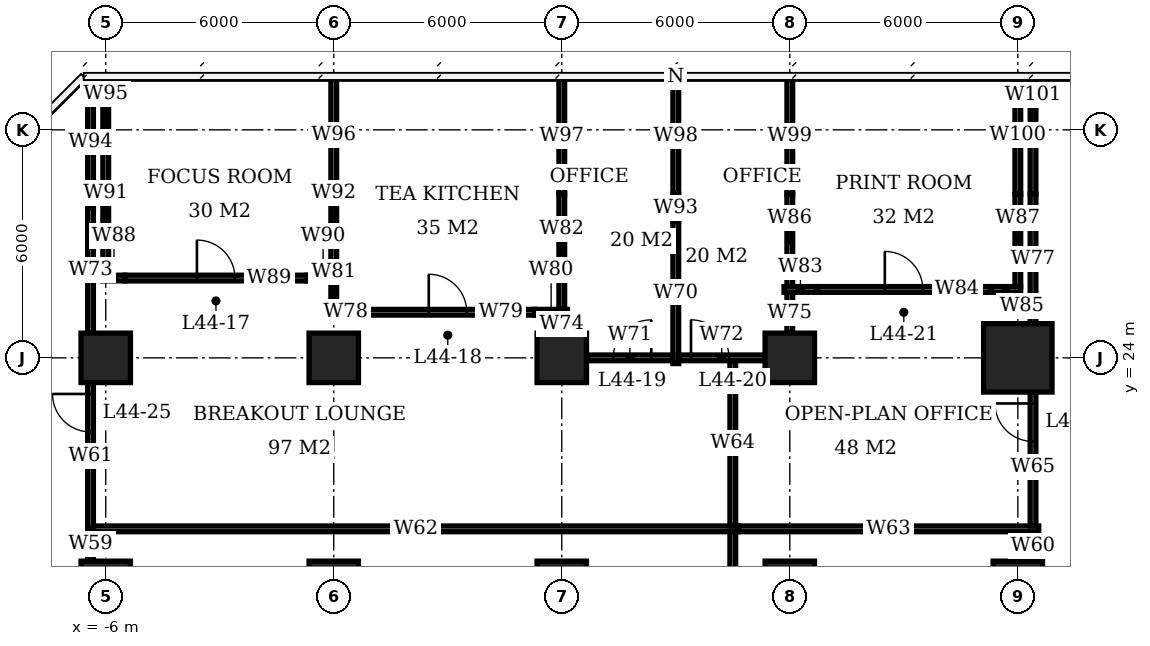
"""IFC4 building model, lengths in metres.
Left out: names, types, materials, properties, quantities, classifications, styles, units other than length and angle.
Written with IfcOpenShell. Run it as: python <this file> out.ifc"""

import sys

from ifc_helpers import new_model, si_unit, direction, frame, frame_2d, origin, origin_2d, place, context, subcontext, project, spatial, rectangle, extrude, element, fill, save


model = new_model("IFC4")
c1 = context("Model", 3, precision=1e-05, world=origin(), true_north=direction((0.0, 1.0)))
c2 = subcontext(c1, "Body", "Model", "MODEL_VIEW")
j1 = project(units=[si_unit("LENGTHUNIT", "METRE"), si_unit("PLANEANGLEUNIT", "RADIAN")], contexts=[c1])
p1 = place(None, origin())
s1 = spatial("IfcSite", under=j1, at=p1, CompositionType="ELEMENT")
p2 = place(p1, origin())
s2 = spatial("IfcBuilding", under=s1, at=p2, CompositionType="ELEMENT")
p3 = place(p2, frame((0.0, 0.0, 181.1)))
s3 = spatial("IfcBuildingStorey", under=s2, at=p3, CompositionType="ELEMENT", Elevation=181.1)
for number, where, z_axis, x_axis in (
    (1, (-6.0, 18.0, 0.0), (0.0, 0.0, 1.0), (1.0, 0.0, 0.0)),
    (2, (-6.0, 24.0, 0.0), (0.0, 0.0, 1.0), (1.0, 0.0, 0.0)),
    (3, (0.0, 18.0, 0.0), (0.0, 0.0, 1.0), (1.0, 0.0, 0.0)),
    (4, (0.0, 24.0, 0.0), (0.0, 0.0, 1.0), (1.0, 0.0, 0.0)),
    (5, (6.0, 18.0, 0.0), (0.0, 0.0, 1.0), (1.0, 0.0, 0.0)),
    (6, (6.0, 24.0, 0.0), (0.0, 0.0, 1.0), (1.0, 0.0, 0.0)),
    (7, (12.0, 18.0, 0.0), (0.0, 0.0, 1.0), (1.0, 0.0, 0.0)),
    (8, (12.0, 24.0, 0.0), (0.0, 0.0, 1.0), (1.0, 0.0, 0.0)),
    (9, (18.0, 18.0, 0.0), (0.0, 0.0, 1.0), (1.0, 0.0, 0.0)),
):
    element("IfcColumn", number, at=place(p3, frame(where, z_axis=z_axis, x_axis=x_axis)), inside=s3, PredefinedType="COLUMN", context=c2, shape_type="SweptSolid", body=[
        extrude(rectangle(XDim=1.3, YDim=1.3, at=origin_2d()), origin(), (0.0, 0.0, 1.0), 3.9),
    ])
p4 = place(p3, frame((18.0, 24.0, 0.0), z_axis=(0.0, 0.0, 1.0), x_axis=(1.0, 0.0, 0.0)))
e10 = element("IfcColumn", 10, at=p4, inside=s3, PredefinedType="COLUMN", context=c2, shape_type="SweptSolid", body=[
    extrude(rectangle(XDim=1.8, YDim=1.8, at=origin_2d()), origin(), (0.0, 0.0, 1.0), 3.9),
])
p5 = place(p3, frame((6.66, 24.0, 0.0), z_axis=(0.0, 0.0, 1.0), x_axis=(1.0, 0.0, 0.0)))
e11 = element("IfcWall", 11, at=p5, inside=s3, PredefinedType="PARTITIONING", context=c2, shape_type="SweptSolid", body=[
    extrude(rectangle(XDim=2.265, YDim=0.15, at=frame_2d((1.133, 0.0))), origin(), (0.0, 0.0, 1.0), 3.65),
])
p6 = place(p5, frame((0.695, 0.0, 0.0)))
e12 = element("IfcOpeningElement", 12, at=p6, cuts=e11, PredefinedType="OPENING", context=c2, shape_type="SweptSolid", body=[
    extrude(rectangle(XDim=1.0, YDim=2.1, at=frame_2d((0.5, 1.05))), frame((0.0, 0.085, 0.0), z_axis=(0.0, -1.0, 0.0), x_axis=(1.0, 0.0, 0.0)), (0.0, 0.0, 1.0), 0.17),
])
p7 = place(p3, frame((9.075, 24.0, 0.0), z_axis=(0.0, 0.0, 1.0), x_axis=(1.0, 0.0, 0.0)))
e13 = element("IfcWall", 13, at=p7, inside=s3, PredefinedType="PARTITIONING", context=c2, shape_type="SweptSolid", body=[
    extrude(rectangle(XDim=2.265, YDim=0.15, at=frame_2d((1.133, 0.0))), origin(), (0.0, 0.0, 1.0), 3.65),
])
p8 = place(p7, frame((0.325, 0.0, 0.0)))
e14 = element("IfcOpeningElement", 14, at=p8, cuts=e13, PredefinedType="OPENING", context=c2, shape_type="SweptSolid", body=[
    extrude(rectangle(XDim=1.0, YDim=2.1, at=frame_2d((0.5, 1.05))), frame((0.0, 0.085, 0.0), z_axis=(0.0, -1.0, 0.0), x_axis=(1.0, 0.0, 0.0)), (0.0, 0.0, 1.0), 0.17),
])
p9 = place(p3, frame((-0.075, 25.2, 0.0), z_axis=(0.0, 0.0, 1.0), x_axis=(1.0, 0.0, 0.0)))
e15 = element("IfcWall", 15, at=p9, inside=s3, PredefinedType="PARTITIONING", context=c2, shape_type="SweptSolid", body=[
    extrude(rectangle(XDim=0.785, YDim=0.15, at=frame_2d((0.393, 0.0))), origin(), (0.0, 0.0, 1.0), 2.65),
])
p10 = place(p3, frame((0.71, 25.2, 0.0), z_axis=(0.0, 0.0, 1.0), x_axis=(1.0, 0.0, 0.0)))
e16 = element("IfcWall", 16, at=p10, inside=s3, PredefinedType="PARTITIONING", context=c2, shape_type="SweptSolid", body=[
    extrude(rectangle(XDim=4.58, YDim=0.15, at=frame_2d((2.29, 0.0))), origin(), (0.0, 0.0, 1.0), 3.65),
])
p11 = place(p10, frame((1.79, 0.0, 0.0)))
e17 = element("IfcOpeningElement", 17, at=p11, cuts=e16, PredefinedType="OPENING", context=c2, shape_type="SweptSolid", body=[
    extrude(rectangle(XDim=1.0, YDim=2.1, at=frame_2d((0.5, 1.05))), frame((0.0, 0.085, 0.0), z_axis=(0.0, -1.0, 0.0), x_axis=(1.0, 0.0, 0.0)), (0.0, 0.0, 1.0), 0.17),
])
for number, where, z_axis, x_axis in (
    (18, (5.29, 25.2, 0.0), (0.0, 0.0, 1.0), (1.0, 0.0, 0.0)),
    (19, (11.85, 25.8, 0.0), (0.0, 0.0, 1.0), (1.0, 0.0, 0.0)),
):
    element("IfcWall", number, at=place(p3, frame(where, z_axis=z_axis, x_axis=x_axis)), inside=s3, PredefinedType="PARTITIONING", context=c2, shape_type="SweptSolid", body=[
        extrude(rectangle(XDim=0.86, YDim=0.15, at=frame_2d((0.43, 0.0))), origin(), (0.0, 0.0, 1.0), 2.65),
    ])
p12 = place(p3, frame((12.71, 25.8, 0.0), z_axis=(0.0, 0.0, 1.0), x_axis=(1.0, 0.0, 0.0)))
e20 = element("IfcWall", 20, at=p12, inside=s3, PredefinedType="PARTITIONING", context=c2, shape_type="SweptSolid", body=[
    extrude(rectangle(XDim=4.58, YDim=0.15, at=frame_2d((2.29, 0.0))), origin(), (0.0, 0.0, 1.0), 3.65),
])
p13 = place(p12, frame((1.79, 0.0, 0.0)))
e21 = element("IfcOpeningElement", 21, at=p13, cuts=e20, PredefinedType="OPENING", context=c2, shape_type="SweptSolid", body=[
    extrude(rectangle(XDim=1.0, YDim=2.1, at=frame_2d((0.5, 1.05))), frame((0.0, 0.085, 0.0), z_axis=(0.0, -1.0, 0.0), x_axis=(1.0, 0.0, 0.0)), (0.0, 0.0, 1.0), 0.17),
])
p14 = place(p3, frame((17.29, 25.8, 0.0), z_axis=(0.0, 0.0, 1.0), x_axis=(1.0, 0.0, 0.0)))
e22 = element("IfcWall", 22, at=p14, inside=s3, PredefinedType="PARTITIONING", context=c2, shape_type="SweptSolid", body=[
    extrude(rectangle(XDim=0.785, YDim=0.15, at=frame_2d((0.393, 0.0))), origin(), (0.0, 0.0, 1.0), 2.65),
])
p15 = place(p3, frame((-6.075, 26.1, 0.0), z_axis=(0.0, 0.0, 1.0), x_axis=(1.0, 0.0, 0.0)))
e23 = element("IfcWall", 23, at=p15, inside=s3, PredefinedType="PARTITIONING", context=c2, shape_type="SweptSolid", body=[
    extrude(rectangle(XDim=0.585, YDim=0.15, at=frame_2d((0.292, 0.0))), origin(), (0.0, 0.0, 1.0), 2.65),
])
p16 = place(p3, frame((-5.49, 26.1, 0.0), z_axis=(0.0, 0.0, 1.0), x_axis=(1.0, 0.0, 0.0)))
e24 = element("IfcWall", 24, at=p16, inside=s3, PredefinedType="PARTITIONING", context=c2, shape_type="SweptSolid", body=[
    extrude(rectangle(XDim=4.78, YDim=0.15, at=frame_2d((2.39, 0.0))), origin(), (0.0, 0.0, 1.0), 3.65),
])
p17 = place(p16, frame((1.89, 0.0, 0.0)))
e25 = element("IfcOpeningElement", 25, at=p17, cuts=e24, PredefinedType="OPENING", context=c2, shape_type="SweptSolid", body=[
    extrude(rectangle(XDim=1.0, YDim=2.1, at=frame_2d((0.5, 1.05))), frame((0.0, 0.085, 0.0), z_axis=(0.0, -1.0, 0.0), x_axis=(1.0, 0.0, 0.0)), (0.0, 0.0, 1.0), 0.17),
])
p18 = place(p3, frame((-0.71, 26.1, 0.0), z_axis=(0.0, 0.0, 1.0), x_axis=(1.0, 0.0, 0.0)))
e26 = element("IfcWall", 26, at=p18, inside=s3, PredefinedType="PARTITIONING", context=c2, shape_type="SweptSolid", body=[
    extrude(rectangle(XDim=0.86, YDim=0.15, at=frame_2d((0.43, 0.0))), origin(), (0.0, 0.0, 1.0), 2.65),
])
p19 = place(p3, frame((-6.0, 26.175, 0.0), z_axis=(0.0, 0.0, 1.0), x_axis=(0.0, 1.0, 0.0)))
e27 = element("IfcWall", 27, at=p19, inside=s3, PredefinedType="PARTITIONING", context=c2, shape_type="SweptSolid", body=[
    extrude(rectangle(XDim=2.135, YDim=0.15, at=frame_2d((1.067, 0.0))), origin(), (0.0, 0.0, 1.0), 2.65),
])
p20 = place(p3, frame((-6.0, 28.31, 0.0), z_axis=(0.0, 0.0, 1.0), x_axis=(0.0, 1.0, 0.0)))
e28 = element("IfcWall", 28, at=p20, inside=s3, PredefinedType="PARTITIONING", context=c2, shape_type="SweptSolid", body=[
    extrude(rectangle(XDim=3.09, YDim=0.15, at=frame_2d((1.545, 0.0))), origin(), (0.0, 0.0, 1.0), 3.65),
])
p21 = place(p3, frame((0.0, 25.275, 0.0), z_axis=(0.0, 0.0, 1.0), x_axis=(0.0, 1.0, 0.0)))
e29 = element("IfcWall", 29, at=p21, inside=s3, PredefinedType="PARTITIONING", context=c2, shape_type="SweptSolid", body=[
    extrude(rectangle(XDim=0.75, YDim=0.15, at=frame_2d((0.375, 0.0))), origin(), (0.0, 0.0, 1.0), 2.65),
])
p22 = place(p3, frame((0.0, 26.175, 0.0), z_axis=(0.0, 0.0, 1.0), x_axis=(0.0, 1.0, 0.0)))
e30 = element("IfcWall", 30, at=p22, inside=s3, PredefinedType="PARTITIONING", context=c2, shape_type="SweptSolid", body=[
    extrude(rectangle(XDim=2.135, YDim=0.15, at=frame_2d((1.067, 0.0))), origin(), (0.0, 0.0, 1.0), 2.65),
])
p23 = place(p3, frame((0.0, 28.31, 0.0), z_axis=(0.0, 0.0, 1.0), x_axis=(0.0, 1.0, 0.0)))
e31 = element("IfcWall", 31, at=p23, inside=s3, PredefinedType="PARTITIONING", context=c2, shape_type="SweptSolid", body=[
    extrude(rectangle(XDim=3.09, YDim=0.15, at=frame_2d((1.545, 0.0))), origin(), (0.0, 0.0, 1.0), 3.65),
])
p24 = place(p3, frame((6.0, 24.65, 0.0), z_axis=(0.0, 0.0, 1.0), x_axis=(0.0, 1.0, 0.0)))
e32 = element("IfcWall", 32, at=p24, inside=s3, PredefinedType="PARTITIONING", context=c2, shape_type="SweptSolid", body=[
    extrude(rectangle(XDim=0.475, YDim=0.15, at=frame_2d((0.238, 0.0))), origin(), (0.0, 0.0, 1.0), 2.65),
])
p25 = place(p3, frame((6.0, 25.275, 0.0), z_axis=(0.0, 0.0, 1.0), x_axis=(0.0, 1.0, 0.0)))
e33 = element("IfcWall", 33, at=p25, inside=s3, PredefinedType="PARTITIONING", context=c2, shape_type="SweptSolid", body=[
    extrude(rectangle(XDim=3.035, YDim=0.15, at=frame_2d((1.518, 0.0))), origin(), (0.0, 0.0, 1.0), 2.65),
])
p26 = place(p3, frame((6.0, 28.31, 0.0), z_axis=(0.0, 0.0, 1.0), x_axis=(0.0, 1.0, 0.0)))
e34 = element("IfcWall", 34, at=p26, inside=s3, PredefinedType="PARTITIONING", context=c2, shape_type="SweptSolid", body=[
    extrude(rectangle(XDim=3.04, YDim=0.15, at=frame_2d((1.52, 0.0))), origin(), (0.0, 0.0, 1.0), 3.65),
])
p27 = place(p3, frame((9.0, 23.85, 0.0), z_axis=(0.0, 0.0, 1.0), x_axis=(0.0, 1.0, 0.0)))
e35 = element("IfcWall", 35, at=p27, inside=s3, PredefinedType="PARTITIONING", context=c2, shape_type="SweptSolid", body=[
    extrude(rectangle(XDim=3.74, YDim=0.15, at=frame_2d((1.87, 0.0))), origin(), (0.0, 0.0, 1.0), 3.65),
])
p28 = place(p3, frame((9.0, 27.59, 0.0), z_axis=(0.0, 0.0, 1.0), x_axis=(0.0, 1.0, 0.0)))
e36 = element("IfcWall", 36, at=p28, inside=s3, PredefinedType="PARTITIONING", context=c2, shape_type="SweptSolid", body=[
    extrude(rectangle(XDim=0.72, YDim=0.15, at=frame_2d((0.36, 0.0))), origin(), (0.0, 0.0, 1.0), 2.65),
])
p29 = place(p3, frame((9.0, 28.31, 0.0), z_axis=(0.0, 0.0, 1.0), x_axis=(0.0, 1.0, 0.0)))
e37 = element("IfcWall", 37, at=p29, inside=s3, PredefinedType="PARTITIONING", context=c2, shape_type="SweptSolid", body=[
    extrude(rectangle(XDim=3.04, YDim=0.15, at=frame_2d((1.52, 0.0))), origin(), (0.0, 0.0, 1.0), 3.65),
])
p30 = place(p3, frame((12.0, 24.65, 0.0), z_axis=(0.0, 0.0, 1.0), x_axis=(0.0, 1.0, 0.0)))
e38 = element("IfcWall", 38, at=p30, inside=s3, PredefinedType="PARTITIONING", context=c2, shape_type="SweptSolid", body=[
    extrude(rectangle(XDim=1.075, YDim=0.15, at=frame_2d((0.538, 0.0))), origin(), (0.0, 0.0, 1.0), 2.65),
])
p31 = place(p3, frame((12.0, 25.875, 0.0), z_axis=(0.0, 0.0, 1.0), x_axis=(0.0, 1.0, 0.0)))
e39 = element("IfcWall", 39, at=p31, inside=s3, PredefinedType="PARTITIONING", context=c2, shape_type="SweptSolid", body=[
    extrude(rectangle(XDim=2.435, YDim=0.15, at=frame_2d((1.218, 0.0))), origin(), (0.0, 0.0, 1.0), 2.65),
])
p32 = place(p3, frame((12.0, 28.31, 0.0), z_axis=(0.0, 0.0, 1.0), x_axis=(0.0, 1.0, 0.0)))
e40 = element("IfcWall", 40, at=p32, inside=s3, PredefinedType="PARTITIONING", context=c2, shape_type="SweptSolid", body=[
    extrude(rectangle(XDim=3.04, YDim=0.15, at=frame_2d((1.52, 0.0))), origin(), (0.0, 0.0, 1.0), 3.65),
])
p33 = place(p3, frame((18.0, 25.875, 0.0), z_axis=(0.0, 0.0, 1.0), x_axis=(0.0, 1.0, 0.0)))
e41 = element("IfcWall", 41, at=p33, inside=s3, PredefinedType="PARTITIONING", context=c2, shape_type="SweptSolid", body=[
    extrude(rectangle(XDim=2.435, YDim=0.15, at=frame_2d((1.218, 0.0))), origin(), (0.0, 0.0, 1.0), 2.65),
])
p34 = place(p3, frame((18.0, 28.31, 0.0), z_axis=(0.0, 0.0, 1.0), x_axis=(0.0, 1.0, 0.0)))
e42 = element("IfcWall", 42, at=p34, inside=s3, PredefinedType="PARTITIONING", context=c2, shape_type="SweptSolid", body=[
    extrude(rectangle(XDim=3.09, YDim=0.15, at=frame_2d((1.545, 0.0))), origin(), (0.0, 0.0, 1.0), 3.65),
])
p35 = place(p3, frame((-6.4, 18.65, 0.0), z_axis=(0.0, 0.0, 1.0), x_axis=(0.0, 1.0, 0.0)))
e43 = element("IfcWall", 43, at=p35, inside=s3, PredefinedType="PARTITIONING", context=c2, shape_type="SweptSolid", body=[
    extrude(rectangle(XDim=0.925, YDim=0.15, at=frame_2d((0.462, 0.0))), origin(), (0.0, 0.0, 1.0), 3.65),
])
p36 = place(p3, frame((-6.4, 19.5, 0.0), z_axis=(0.0, 0.0, 1.0), x_axis=(0.0, 1.0, 0.0)))
e44 = element("IfcWall", 44, at=p36, inside=s3, PredefinedType="PARTITIONING", context=c2, shape_type="SweptSolid", body=[
    extrude(rectangle(XDim=3.85, YDim=0.15, at=frame_2d((1.925, 0.0))), origin(), (0.0, 0.0, 1.0), 3.65),
])
p37 = place(p36, frame((2.55, 0.0, 0.0)))
e45 = element("IfcOpeningElement", 45, at=p37, cuts=e44, PredefinedType="OPENING", context=c2, shape_type="SweptSolid", body=[
    extrude(rectangle(XDim=1.0, YDim=2.1, at=frame_2d((0.5, 1.05))), frame((0.0, 0.085, 0.0), z_axis=(0.0, -1.0, 0.0), x_axis=(1.0, 0.0, 0.0)), (0.0, 0.0, 1.0), 0.17),
])
p38 = place(p3, frame((-6.4, 24.65, 0.0), z_axis=(0.0, 0.0, 1.0), x_axis=(0.0, 1.0, 0.0)))
e46 = element("IfcWall", 46, at=p38, inside=s3, PredefinedType="PARTITIONING", context=c2, shape_type="SweptSolid", body=[
    extrude(rectangle(XDim=3.31, YDim=0.15, at=frame_2d((1.655, 0.0))), origin(), (0.0, 0.0, 1.0), 2.65),
])
p39 = place(p3, frame((-6.4, 27.96, 0.0), z_axis=(0.0, 0.0, 1.0), x_axis=(0.0, 1.0, 0.0)))
e47 = element("IfcWall", 47, at=p39, inside=s3, PredefinedType="PARTITIONING", context=c2, shape_type="SweptSolid", body=[
    extrude(rectangle(XDim=3.44, YDim=0.15, at=frame_2d((1.72, 0.0))), origin(), (0.0, 0.0, 1.0), 3.65),
])
p40 = place(p3, frame((-6.325, 19.5, 0.0), z_axis=(0.0, 0.0, 1.0), x_axis=(1.0, 0.0, 0.0)))
e48 = element("IfcWall", 48, at=p40, inside=s3, PredefinedType="PARTITIONING", context=c2, shape_type="SweptSolid", body=[
    extrude(rectangle(XDim=16.975, YDim=0.15, at=frame_2d((8.487, 0.0))), origin(), (0.0, 0.0, 1.0), 3.65),
])
p41 = place(p3, frame((10.5, 12.4, 0.0), z_axis=(0.0, 0.0, 1.0), x_axis=(0.0, 1.0, 0.0)))
e49 = element("IfcWall", 49, at=p41, inside=s3, PredefinedType="PARTITIONING", context=c2, shape_type="SweptSolid", body=[
    extrude(rectangle(XDim=7.025, YDim=0.15, at=frame_2d((3.513, 0.0))), origin(), (0.0, 0.0, 1.0), 3.65),
])
p42 = place(p3, frame((10.5, 19.575, 0.0), z_axis=(0.0, 0.0, 1.0), x_axis=(0.0, 1.0, 0.0)))
e50 = element("IfcWall", 50, at=p42, inside=s3, PredefinedType="PARTITIONING", context=c2, shape_type="SweptSolid", body=[
    extrude(rectangle(XDim=4.35, YDim=0.15, at=frame_2d((2.175, 0.0))), origin(), (0.0, 0.0, 1.0), 3.65),
])
p43 = place(p3, frame((10.65, 19.5, 0.0), z_axis=(0.0, 0.0, 1.0), x_axis=(1.0, 0.0, 0.0)))
e51 = element("IfcWall", 51, at=p43, inside=s3, PredefinedType="PARTITIONING", context=c2, shape_type="SweptSolid", body=[
    extrude(rectangle(XDim=7.9, YDim=0.15, at=frame_2d((3.95, 0.0))), origin(), (0.0, 0.0, 1.0), 3.65),
])
p44 = place(p3, frame((18.4, 18.65, 0.0), z_axis=(0.0, 0.0, 1.0), x_axis=(0.0, 1.0, 0.0)))
e52 = element("IfcWall", 52, at=p44, inside=s3, PredefinedType="PARTITIONING", context=c2, shape_type="SweptSolid", body=[
    extrude(rectangle(XDim=0.775, YDim=0.15, at=frame_2d((0.388, 0.0))), origin(), (0.0, 0.0, 1.0), 3.65),
])
p45 = place(p3, frame((18.4, 19.575, 0.0), z_axis=(0.0, 0.0, 1.0), x_axis=(0.0, 1.0, 0.0)))
e53 = element("IfcWall", 53, at=p45, inside=s3, PredefinedType="PARTITIONING", context=c2, shape_type="SweptSolid", body=[
    extrude(rectangle(XDim=3.525, YDim=0.15, at=frame_2d((1.763, 0.0))), origin(), (0.0, 0.0, 1.0), 3.65),
])
p46 = place(p45, frame((2.225, 0.0, 0.0)))
e54 = element("IfcOpeningElement", 54, at=p46, cuts=e53, PredefinedType="OPENING", context=c2, shape_type="SweptSolid", body=[
    extrude(rectangle(XDim=1.0, YDim=2.1, at=frame_2d((0.5, 1.05))), frame((0.0, 0.085, 0.0), z_axis=(0.0, -1.0, 0.0), x_axis=(1.0, 0.0, 0.0)), (0.0, 0.0, 1.0), 0.17),
])
p47 = place(p3, frame((18.4, 24.9, 0.0), z_axis=(0.0, 0.0, 1.0), x_axis=(0.0, 1.0, 0.0)))
e55 = element("IfcWall", 55, at=p47, inside=s3, PredefinedType="PARTITIONING", context=c2, shape_type="SweptSolid", body=[
    extrude(rectangle(XDim=3.41, YDim=0.15, at=frame_2d((1.705, 0.0))), origin(), (0.0, 0.0, 1.0), 2.65),
])
p48 = place(p3, frame((18.4, 28.31, 0.0), z_axis=(0.0, 0.0, 1.0), x_axis=(0.0, 1.0, 0.0)))
e56 = element("IfcWall", 56, at=p48, inside=s3, PredefinedType="PARTITIONING", context=c2, shape_type="SweptSolid", body=[
    extrude(rectangle(XDim=3.04, YDim=0.15, at=frame_2d((1.52, 0.0))), origin(), (0.0, 0.0, 1.0), 3.65),
])
p49 = place(p17, origin())
e57 = element("IfcDoor", 57, at=p49, inside=s3, OperationType="SINGLE_SWING_LEFT", PredefinedType="DOOR", context=c2, shape_type="SweptSolid", body=[
    extrude(rectangle(XDim=1.0, YDim=2.1, at=frame_2d((0.5, 1.05))), frame((0.0, 0.025, 0.0), z_axis=(0.0, -1.0, 0.0), x_axis=(1.0, 0.0, 0.0)), (0.0, 0.0, 1.0), 0.05),
])
fill(e25, e57)
p50 = place(p11, origin())
e58 = element("IfcDoor", 58, at=p50, inside=s3, OperationType="SINGLE_SWING_LEFT", PredefinedType="DOOR", context=c2, shape_type="SweptSolid", body=[
    extrude(rectangle(XDim=1.0, YDim=2.1, at=frame_2d((0.5, 1.05))), frame((0.0, 0.025, 0.0), z_axis=(0.0, -1.0, 0.0), x_axis=(1.0, 0.0, 0.0)), (0.0, 0.0, 1.0), 0.05),
])
fill(e17, e58)
p51 = place(p6, origin())
e59 = element("IfcDoor", 59, at=p51, inside=s3, OperationType="SINGLE_SWING_RIGHT", PredefinedType="DOOR", context=c2, shape_type="SweptSolid", body=[
    extrude(rectangle(XDim=1.0, YDim=2.1, at=frame_2d((0.5, 1.05))), frame((0.0, 0.025, 0.0), z_axis=(0.0, -1.0, 0.0), x_axis=(1.0, 0.0, 0.0)), (0.0, 0.0, 1.0), 0.05),
])
fill(e12, e59)
p52 = place(p8, origin())
e60 = element("IfcDoor", 60, at=p52, inside=s3, OperationType="SINGLE_SWING_LEFT", PredefinedType="DOOR", context=c2, shape_type="SweptSolid", body=[
    extrude(rectangle(XDim=1.0, YDim=2.1, at=frame_2d((0.5, 1.05))), frame((0.0, 0.025, 0.0), z_axis=(0.0, -1.0, 0.0), x_axis=(1.0, 0.0, 0.0)), (0.0, 0.0, 1.0), 0.05),
])
fill(e14, e60)
p53 = place(p13, origin())
e61 = element("IfcDoor", 61, at=p53, inside=s3, OperationType="SINGLE_SWING_LEFT", PredefinedType="DOOR", context=c2, shape_type="SweptSolid", body=[
    extrude(rectangle(XDim=1.0, YDim=2.1, at=frame_2d((0.5, 1.05))), frame((0.0, 0.025, 0.0), z_axis=(0.0, -1.0, 0.0), x_axis=(1.0, 0.0, 0.0)), (0.0, 0.0, 1.0), 0.05),
])
fill(e21, e61)
p54 = place(p37, origin())
e62 = element("IfcDoor", 62, at=p54, inside=s3, OperationType="SINGLE_SWING_RIGHT", PredefinedType="DOOR", context=c2, shape_type="SweptSolid", body=[
    extrude(rectangle(XDim=1.0, YDim=2.1, at=frame_2d((0.5, 1.05))), frame((0.0, 0.025, 0.0), z_axis=(0.0, -1.0, 0.0), x_axis=(1.0, 0.0, 0.0)), (0.0, 0.0, 1.0), 0.05),
])
fill(e45, e62)
p55 = place(p46, origin())
e63 = element("IfcDoor", 63, at=p55, inside=s3, OperationType="SINGLE_SWING_RIGHT", PredefinedType="DOOR", context=c2, shape_type="SweptSolid", body=[
    extrude(rectangle(XDim=1.0, YDim=2.1, at=frame_2d((0.5, 1.05))), frame((0.0, 0.025, 0.0), z_axis=(0.0, -1.0, 0.0), x_axis=(1.0, 0.0, 0.0)), (0.0, 0.0, 1.0), 0.05),
])
fill(e54, e63)
save(model, sys.argv[1])
